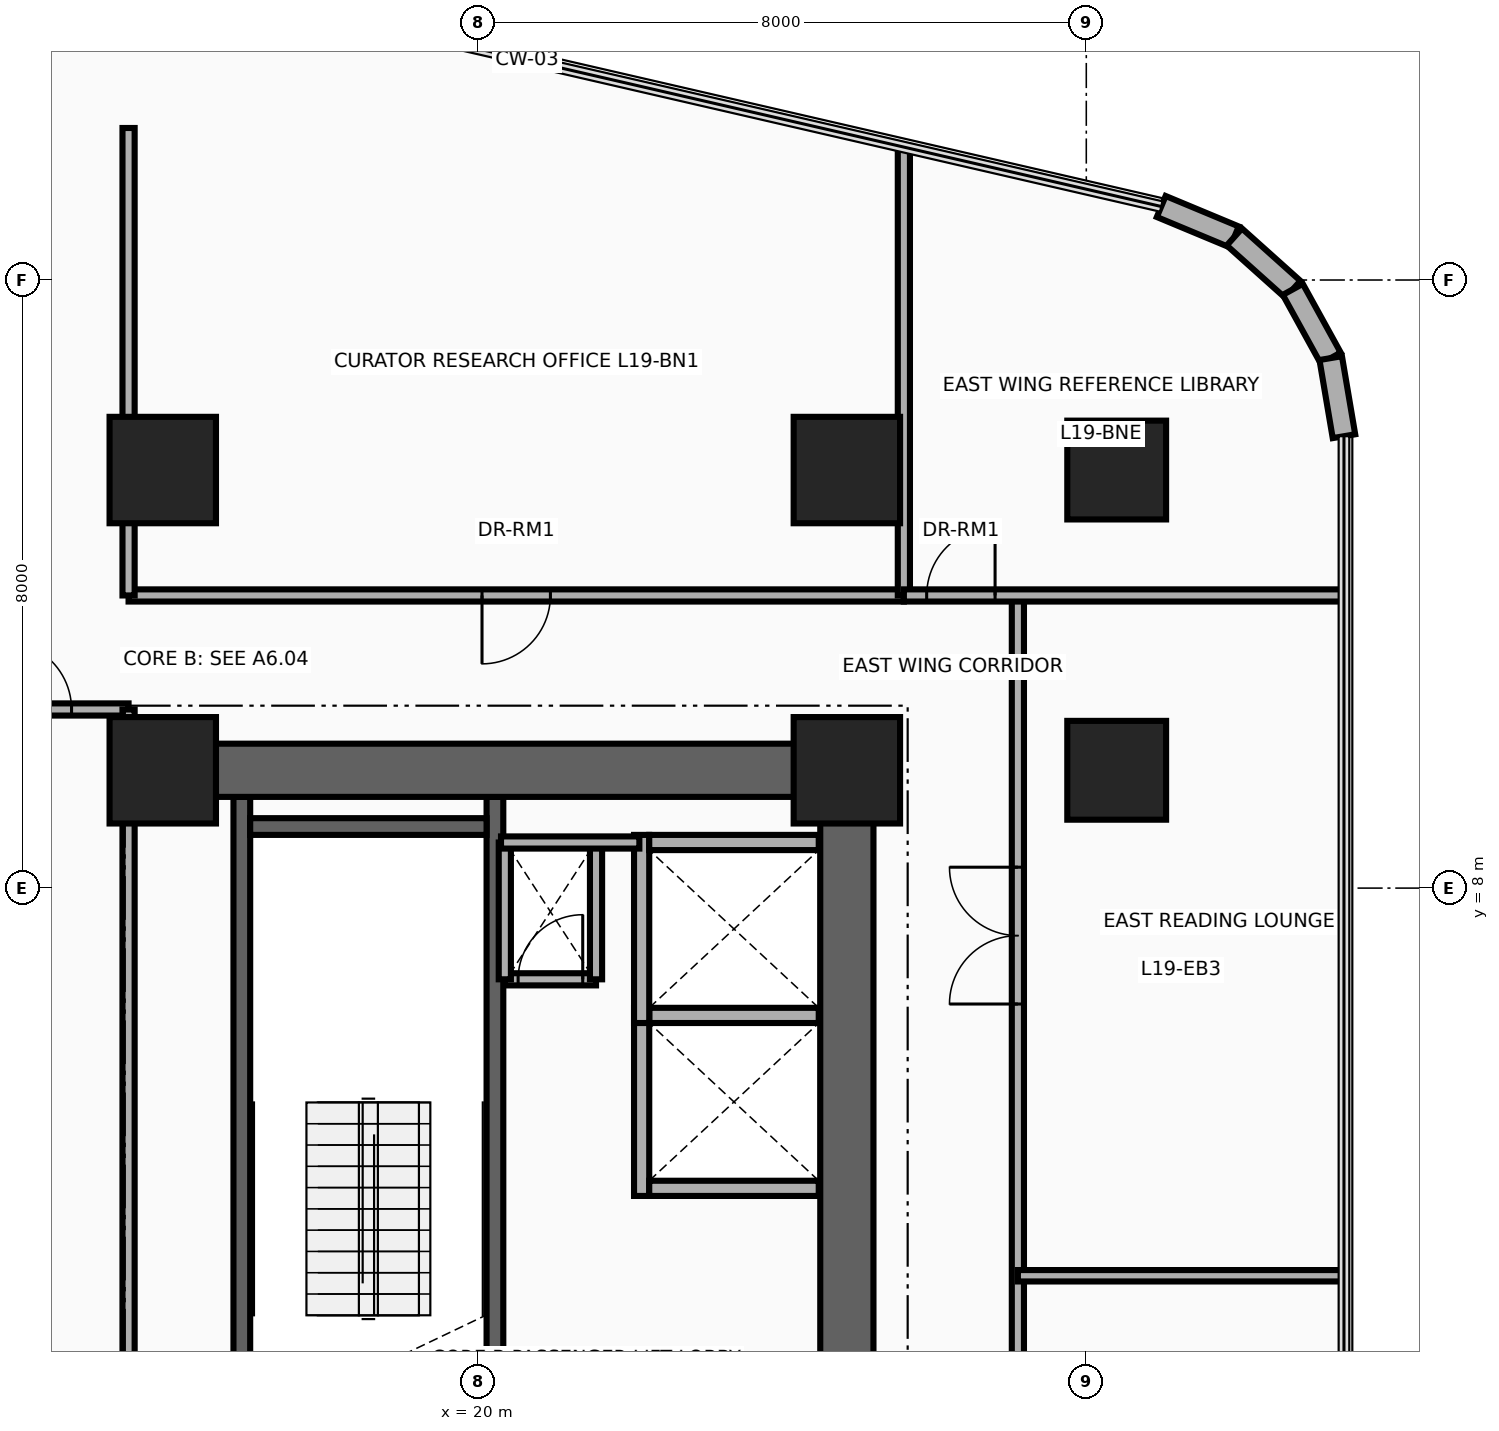
"""IFC4 building model, lengths in metres.
Left out: names, types, materials, properties, quantities, classifications, styles, units other than length and angle.
Written with IfcOpenShell. Run it as: python <this file> out.ifc"""

import sys

from ifc_helpers import new_model, si_unit, direction, frame, frame_2d, origin, origin_2d, place, context, subcontext, project, spatial, rectangle, circle, extrude, source, transform, mapped, element, fill, save


model = new_model("IFC4")
c1 = context("Model", 3, precision=1e-05, world=origin(), true_north=direction((0.0, 1.0)))
c2 = subcontext(c1, "Body", "Model", "MODEL_VIEW")
j1 = project(units=[si_unit("LENGTHUNIT", "METRE"), si_unit("PLANEANGLEUNIT", "RADIAN")], contexts=[c1])
p1 = place(None, origin())
s1 = spatial("IfcSite", under=j1, at=p1, CompositionType="ELEMENT")
p2 = place(p1, origin())
s2 = spatial("IfcBuilding", under=s1, at=p2, CompositionType="ELEMENT")
p3 = place(p2, frame((0.0, 0.0, 77.8)))
s3 = spatial("IfcBuildingStorey", under=s2, at=p3, CompositionType="ELEMENT", Elevation=77.8)
for number, where, z_axis, x_axis in (
    (1, (16.89, 0.68, 0.0), (0.0, 0.0, 1.0), (0.0, 1.0, 0.0)),
    (2, (20.22, 0.68, 0.0), (0.0, 0.0, 1.0), (0.0, 1.0, 0.0)),
):
    element("IfcWall", number, at=place(p3, frame(where, z_axis=z_axis, x_axis=x_axis)), inside=s3, PredefinedType="SHEAR", context=c2, shape_type="SweptSolid", body=[
        extrude(rectangle(XDim=8.52, YDim=0.22, at=frame_2d((4.26, 0.0))), origin(), (0.0, 0.0, 1.0), 3.46),
    ])
p4 = place(p3, frame((17.0, 8.81, 0.0), z_axis=(0.0, 0.0, 1.0), x_axis=(1.0, 0.0, 0.0)))
e3 = element("IfcWall", 3, at=p4, inside=s3, PredefinedType="SHEAR", context=c2, shape_type="SweptSolid", body=[
    extrude(rectangle(XDim=3.11, YDim=0.22, at=frame_2d((1.555, 0.0))), origin(), (0.0, 0.0, 1.0), 3.46),
])
p5 = place(p3, frame((24.85, 0.95, 0.0), z_axis=(0.0, 0.0, 1.0), x_axis=(0.0, 1.0, 0.0)))
e4 = element("IfcWall", 4, at=p5, inside=s3, PredefinedType="SHEAR", context=c2, shape_type="SweptSolid", body=[
    extrude(rectangle(XDim=8.95, YDim=0.7, at=frame_2d((4.475, 0.0))), origin(), (0.0, 0.0, 1.0), 3.46),
])
p6 = place(p3, frame((15.85, 9.55, 0.0), z_axis=(0.0, 0.0, 1.0), x_axis=(1.0, 0.0, 0.0)))
e5 = element("IfcWall", 5, at=p6, inside=s3, PredefinedType="SHEAR", context=c2, shape_type="SweptSolid", body=[
    extrude(rectangle(XDim=9.0, YDim=0.7, at=frame_2d((4.5, 0.0))), origin(), (0.0, 0.0, 1.0), 3.46),
])
m1 = source(origin(), c2, "Body", "SweptSolid", [
    extrude(rectangle(XDim=1.4, YDim=1.4, at=origin_2d()), origin(), (0.0, 0.0, 1.0), 3.7),
])
for number, where, z_axis, x_axis in (
    (6, (15.85, 9.55, 0.0), (0.0, 0.0, 1.0), (1.0, 0.0, 0.0)),
    (7, (24.85, 9.55, 0.0), (0.0, 0.0, 1.0), (1.0, 0.0, 0.0)),
):
    element("IfcColumn", number, at=place(p3, frame(where, z_axis=z_axis, x_axis=x_axis)), inside=s3, PredefinedType="COLUMN", context=c2, shape_type="MappedRepresentation", body=[
        mapped(m1, transform((0.0, 0.0, 0.0), x_axis=(1.0, 0.0, 0.0), y_axis=(0.0, 1.0, 0.0), z_axis=(0.0, 0.0, 1.0), scale=1.0)),
    ])
m2 = source(origin(), c2, "Body", "SweptSolid", [
    extrude(circle(Radius=0.65, at=origin_2d()), origin(), (0.0, 0.0, 1.0), 3.7),
])
p7 = place(p3, frame((28.4, 9.55, 0.0), z_axis=(0.0, 0.0, 1.0), x_axis=(1.0, 0.0, 0.0)))
e8 = element("IfcColumn", 8, at=p7, inside=s3, PredefinedType="COLUMN", context=c2, shape_type="MappedRepresentation", body=[
    mapped(m2, transform((0.0, 0.0, 0.0), x_axis=(1.0, 0.0, 0.0), y_axis=(0.0, 1.0, 0.0), z_axis=(0.0, 0.0, 1.0), scale=1.0)),
])
for number, where, z_axis, x_axis in (
    (9, (15.85, 13.5, 0.0), (0.0, 0.0, 1.0), (1.0, 0.0, 0.0)),
    (10, (24.85, 13.5, 0.0), (0.0, 0.0, 1.0), (1.0, 0.0, 0.0)),
):
    element("IfcColumn", number, at=place(p3, frame(where, z_axis=z_axis, x_axis=x_axis)), inside=s3, PredefinedType="COLUMN", context=c2, shape_type="MappedRepresentation", body=[
        mapped(m1, transform((0.0, 0.0, 0.0), x_axis=(1.0, 0.0, 0.0), y_axis=(0.0, 1.0, 0.0), z_axis=(0.0, 0.0, 1.0), scale=1.0)),
    ])
p8 = place(p3, frame((28.4, 13.5, 0.0), z_axis=(0.0, 0.0, 1.0), x_axis=(1.0, 0.0, 0.0)))
e11 = element("IfcColumn", 11, at=p8, inside=s3, PredefinedType="COLUMN", context=c2, shape_type="MappedRepresentation", body=[
    mapped(m2, transform((0.0, 0.0, 0.0), x_axis=(1.0, 0.0, 0.0), y_axis=(0.0, 1.0, 0.0), z_axis=(0.0, 0.0, 1.0), scale=1.0)),
])
p9 = place(p3, frame((28.986, 16.967, 0.0), z_axis=(0.0, 0.0, 1.0), x_axis=(0.923083852684, -0.384598753136, 0.0)))
e12 = element("IfcWall", 12, at=p9, inside=s3, PredefinedType="SOLIDWALL", context=c2, shape_type="SweptSolid", body=[
    extrude(rectangle(XDim=1.042, YDim=0.3, at=frame_2d((0.521, 0.0))), origin(), (0.0, 0.0, 1.0), 3.46),
])
p10 = place(p3, frame((29.948, 16.566, 0.0), z_axis=(0.0, 0.0, 1.0), x_axis=(0.744585645533, -0.66752694063, 0.0)))
e13 = element("IfcWall", 13, at=p10, inside=s3, PredefinedType="SOLIDWALL", context=c2, shape_type="SweptSolid", body=[
    extrude(rectangle(XDim=1.033, YDim=0.3, at=frame_2d((0.517, 0.0))), origin(), (0.0, 0.0, 1.0), 3.46),
])
p11 = place(p3, frame((30.717, 15.877, 0.0), z_axis=(0.0, 0.0, 1.0), x_axis=(0.482971098131, -0.875636293429, 0.0)))
e14 = element("IfcWall", 14, at=p11, inside=s3, PredefinedType="SOLIDWALL", context=c2, shape_type="SweptSolid", body=[
    extrude(rectangle(XDim=1.033, YDim=0.3, at=frame_2d((0.516, 0.0))), origin(), (0.0, 0.0, 1.0), 3.46),
])
p12 = place(p3, frame((31.216, 14.973, 0.0), z_axis=(0.0, 0.0, 1.0), x_axis=(0.167019462117, -0.985953598946, 0.0)))
e15 = element("IfcWall", 15, at=p12, inside=s3, PredefinedType="SOLIDWALL", context=c2, shape_type="SweptSolid", body=[
    extrude(rectangle(XDim=1.042, YDim=0.3, at=frame_2d((0.521, 0.0))), origin(), (0.0, 0.0, 1.0), 3.46),
])
p13 = place(p3, frame((22.15, 3.95, 0.0), z_axis=(0.0, 0.0, 1.0), x_axis=(0.0, 1.0, 0.0)))
e16 = element("IfcWall", 16, at=p13, inside=s3, PredefinedType="MOVABLE", context=c2, shape_type="SweptSolid", body=[
    extrude(rectangle(XDim=2.475, YDim=0.2, at=frame_2d((1.238, 0.0))), origin(), (0.0, 0.0, 1.0), 3.46),
])
for number, where, z_axis, x_axis in (
    (17, (22.25, 4.05, 0.0), (0.0, 0.0, 1.0), (1.0, 0.0, 0.0)),
    (18, (22.25, 6.325, 0.0), (0.0, 0.0, 1.0), (1.0, 0.0, 0.0)),
):
    element("IfcWall", number, at=place(p3, frame(where, z_axis=z_axis, x_axis=x_axis)), inside=s3, PredefinedType="MOVABLE", context=c2, shape_type="SweptSolid", body=[
        extrude(rectangle(XDim=2.23, YDim=0.2, at=frame_2d((1.115, 0.0))), origin(), (0.0, 0.0, 1.0), 2.245),
    ])
p14 = place(p3, frame((22.15, 6.225, 0.0), z_axis=(0.0, 0.0, 1.0), x_axis=(0.0, 1.0, 0.0)))
e19 = element("IfcWall", 19, at=p14, inside=s3, PredefinedType="MOVABLE", context=c2, shape_type="SweptSolid", body=[
    extrude(rectangle(XDim=2.475, YDim=0.2, at=frame_2d((1.237, 0.0))), origin(), (0.0, 0.0, 1.0), 3.46),
])
p15 = place(p3, frame((22.25, 8.6, 0.0), z_axis=(0.0, 0.0, 1.0), x_axis=(1.0, 0.0, 0.0)))
e20 = element("IfcWall", 20, at=p15, inside=s3, PredefinedType="MOVABLE", context=c2, shape_type="SweptSolid", body=[
    extrude(rectangle(XDim=2.23, YDim=0.2, at=frame_2d((1.115, 0.0))), origin(), (0.0, 0.0, 1.0), 2.245),
])
p16 = place(p3, frame((20.35, 6.8, 0.0), z_axis=(0.0, 0.0, 1.0), x_axis=(1.0, 0.0, 0.0)))
e21 = element("IfcWall", 21, at=p16, inside=s3, PredefinedType="PARTITIONING", context=c2, shape_type="SweptSolid", body=[
    extrude(rectangle(XDim=1.2, YDim=0.16, at=frame_2d((0.6, 0.0))), origin(), (0.0, 0.0, 1.0), 3.46),
])
p17 = place(p16, frame((0.175, 0.0, 0.0)))
e22 = element("IfcOpeningElement", 22, at=p17, cuts=e21, PredefinedType="OPENING", context=c2, shape_type="SweptSolid", body=[
    extrude(rectangle(XDim=0.85, YDim=2.05, at=frame_2d((0.425, 1.025))), frame((0.0, 0.095, 0.0), z_axis=(0.0, -1.0, 0.0), x_axis=(1.0, 0.0, 0.0)), (0.0, 0.0, 1.0), 0.19),
])
for number, where, z_axis, x_axis in (
    (23, (21.55, 6.8, 0.0), (0.0, 0.0, 1.0), (0.0, 1.0, 0.0)),
    (24, (20.35, 6.8, 0.0), (0.0, 0.0, 1.0), (0.0, 1.0, 0.0)),
):
    element("IfcWall", number, at=place(p3, frame(where, z_axis=z_axis, x_axis=x_axis)), inside=s3, PredefinedType="PARTITIONING", context=c2, shape_type="SweptSolid", body=[
        extrude(rectangle(XDim=1.8, YDim=0.16, at=frame_2d((0.9, 0.0))), origin(), (0.0, 0.0, 1.0), 3.46),
    ])
p18 = place(p3, frame((20.3, 8.6, 0.0), z_axis=(0.0, 0.0, 1.0), x_axis=(1.0, 0.0, 0.0)))
e25 = element("IfcWall", 25, at=p18, inside=s3, PredefinedType="PARTITIONING", context=c2, shape_type="SweptSolid", body=[
    extrude(rectangle(XDim=1.82, YDim=0.16, at=frame_2d((0.91, 0.0))), origin(), (0.0, 0.0, 1.0), 3.46),
])
p19 = place(p3, frame((15.4, 11.85, 0.0), z_axis=(0.0, 0.0, 1.0), x_axis=(1.0, 0.0, 0.0)))
e26 = element("IfcWall", 26, at=p19, inside=s3, PredefinedType="PARTITIONING", context=c2, shape_type="SweptSolid", body=[
    extrude(rectangle(XDim=10.2, YDim=0.16, at=frame_2d((5.1, 0.0))), origin(), (0.0, 0.0, 1.0), 2.834),
])
p20 = place(p19, frame((4.65, 0.0, 0.0)))
e27 = element("IfcOpeningElement", 27, at=p20, cuts=e26, PredefinedType="OPENING", context=c2, shape_type="SweptSolid", body=[
    extrude(rectangle(XDim=0.9, YDim=2.1, at=frame_2d((0.45, 1.05))), frame((0.0, 0.095, 0.0), z_axis=(0.0, -1.0, 0.0), x_axis=(1.0, 0.0, 0.0)), (0.0, 0.0, 1.0), 0.19),
])
p21 = place(p3, frame((15.4, 11.85, 0.0), z_axis=(0.0, 0.0, 1.0), x_axis=(0.0, 1.0, 0.0)))
e28 = element("IfcWall", 28, at=p21, inside=s3, PredefinedType="PARTITIONING", context=c2, shape_type="SweptSolid", body=[
    extrude(rectangle(XDim=6.15, YDim=0.16, at=frame_2d((3.075, 0.0))), origin(), (0.0, 0.0, 1.0), 2.583),
])
p22 = place(p3, frame((25.6, 11.85, 0.0), z_axis=(0.0, 0.0, 1.0), x_axis=(0.0, 1.0, 0.0)))
e29 = element("IfcWall", 29, at=p22, inside=s3, PredefinedType="PARTITIONING", context=c2, shape_type="SweptSolid", body=[
    extrude(rectangle(XDim=5.898, YDim=0.16, at=frame_2d((2.949, 0.0))), origin(), (0.0, 0.0, 1.0), 2.583),
])
p23 = place(p3, frame((27.1, -13.89, 0.0), z_axis=(0.0, 0.0, 1.0), x_axis=(0.0, 1.0, 0.0)))
e30 = element("IfcWall", 30, at=p23, inside=s3, PredefinedType="PARTITIONING", context=c2, shape_type="SweptSolid", body=[
    extrude(rectangle(XDim=25.74, YDim=0.16, at=frame_2d((12.87, 0.0))), origin(), (0.0, 0.0, 1.0), 2.583),
])
p24 = place(p23, frame((1.76, 0.0, 0.0)))
e31 = element("IfcOpeningElement", 31, at=p24, cuts=e30, PredefinedType="OPENING", context=c2, shape_type="SweptSolid", body=[
    extrude(rectangle(XDim=1.8, YDim=2.15, at=frame_2d((0.9, 1.075))), frame((0.0, 0.095, 0.0), z_axis=(0.0, -1.0, 0.0), x_axis=(1.0, 0.0, 0.0)), (0.0, 0.0, 1.0), 0.19),
])
p25 = place(p23, frame((12.16, 0.0, 0.0)))
e32 = element("IfcOpeningElement", 32, at=p25, cuts=e30, PredefinedType="OPENING", context=c2, shape_type="SweptSolid", body=[
    extrude(rectangle(XDim=1.8, YDim=2.15, at=frame_2d((0.9, 1.075))), frame((0.0, 0.095, 0.0), z_axis=(0.0, -1.0, 0.0), x_axis=(1.0, 0.0, 0.0)), (0.0, 0.0, 1.0), 0.19),
])
p26 = place(p23, frame((20.365, 0.0, 0.0)))
e33 = element("IfcOpeningElement", 33, at=p26, cuts=e30, PredefinedType="OPENING", context=c2, shape_type="SweptSolid", body=[
    extrude(rectangle(XDim=1.8, YDim=2.15, at=frame_2d((0.9, 1.075))), frame((0.0, 0.095, 0.0), z_axis=(0.0, -1.0, 0.0), x_axis=(1.0, 0.0, 0.0)), (0.0, 0.0, 1.0), 0.19),
])
p27 = place(p3, frame((25.6, 11.85, 0.0), z_axis=(0.0, 0.0, 1.0), x_axis=(1.0, 0.0, 0.0)))
e34 = element("IfcWall", 34, at=p27, inside=s3, PredefinedType="PARTITIONING", context=c2, shape_type="SweptSolid", body=[
    extrude(rectangle(XDim=5.79, YDim=0.16, at=frame_2d((2.895, 0.0))), origin(), (0.0, 0.0, 1.0), 2.896),
])
p28 = place(p27, frame((0.3, 0.0, 0.0)))
e35 = element("IfcOpeningElement", 35, at=p28, cuts=e34, PredefinedType="OPENING", context=c2, shape_type="SweptSolid", body=[
    extrude(rectangle(XDim=0.9, YDim=2.1, at=frame_2d((0.45, 1.05))), frame((0.0, 0.095, 0.0), z_axis=(0.0, -1.0, 0.0), x_axis=(1.0, 0.0, 0.0)), (0.0, 0.0, 1.0), 0.19),
])
p29 = place(p3, frame((27.1, 2.9, 0.0), z_axis=(0.0, 0.0, 1.0), x_axis=(1.0, 0.0, 0.0)))
e36 = element("IfcWall", 36, at=p29, inside=s3, PredefinedType="PARTITIONING", context=c2, shape_type="SweptSolid", body=[
    extrude(rectangle(XDim=4.29, YDim=0.15, at=frame_2d((2.145, 0.0))), origin(), (0.0, 0.0, 1.0), 2.896),
])
p30 = place(p3, frame((13.3, 10.35, 0.0), z_axis=(0.0, 0.0, 1.0), x_axis=(1.0, 0.0, 0.0)))
e37 = element("IfcWall", 37, at=p30, inside=s3, PredefinedType="PARTITIONING", context=c2, shape_type="SweptSolid", body=[
    extrude(rectangle(XDim=2.1, YDim=0.16, at=frame_2d((1.05, 0.0))), origin(), (0.0, 0.0, 1.0), 2.583),
])
p31 = place(p30, frame((0.45, 0.0, 0.0)))
e38 = element("IfcOpeningElement", 38, at=p31, cuts=e37, PredefinedType="OPENING", context=c2, shape_type="SweptSolid", body=[
    extrude(rectangle(XDim=0.9, YDim=2.1, at=frame_2d((0.45, 1.05))), frame((0.0, 0.095, 0.0), z_axis=(0.0, -1.0, 0.0), x_axis=(1.0, 0.0, 0.0)), (0.0, 0.0, 1.0), 0.19),
])
p32 = place(p3, frame((15.4, 1.0, 0.0), z_axis=(0.0, 0.0, 1.0), x_axis=(0.0, 1.0, 0.0)))
e39 = element("IfcWall", 39, at=p32, inside=s3, PredefinedType="PARTITIONING", context=c2, shape_type="SweptSolid", body=[
    extrude(rectangle(XDim=9.35, YDim=0.16, at=frame_2d((4.675, 0.0))), origin(), (0.0, 0.0, 1.0), 2.245),
])
p33 = place(p17, origin())
e40 = element("IfcDoor", 40, at=p33, inside=s3, OperationType="SINGLE_SWING_RIGHT", PredefinedType="DOOR", context=c2, shape_type="SweptSolid", body=[
    extrude(rectangle(XDim=0.85, YDim=2.05, at=frame_2d((0.425, 1.025))), frame((0.0, 0.025, 0.0), z_axis=(0.0, -1.0, 0.0), x_axis=(1.0, 0.0, 0.0)), (0.0, 0.0, 1.0), 0.05),
])
fill(e22, e40)
p34 = place(p20, frame((0.9, 0.0, 0.0), z_axis=(0.0, 0.0, 1.0), x_axis=(-1.0, 0.0, 0.0)))
e41 = element("IfcDoor", 41, at=p34, inside=s3, OperationType="SINGLE_SWING_LEFT", PredefinedType="DOOR", context=c2, shape_type="SweptSolid", body=[
    extrude(rectangle(XDim=0.9, YDim=2.1, at=frame_2d((0.45, 1.05))), frame((0.0, 0.025, 0.0), z_axis=(0.0, -1.0, 0.0), x_axis=(1.0, 0.0, 0.0)), (0.0, 0.0, 1.0), 0.05),
])
fill(e27, e41)
p35 = place(p28, origin())
e42 = element("IfcDoor", 42, at=p35, inside=s3, OperationType="SINGLE_SWING_LEFT", PredefinedType="DOOR", context=c2, shape_type="SweptSolid", body=[
    extrude(rectangle(XDim=0.9, YDim=2.1, at=frame_2d((0.45, 1.05))), frame((0.0, 0.025, 0.0), z_axis=(0.0, -1.0, 0.0), x_axis=(1.0, 0.0, 0.0)), (0.0, 0.0, 1.0), 0.05),
])
fill(e35, e42)
p36 = place(p26, origin())
e43 = element("IfcDoor", 43, at=p36, inside=s3, OperationType="DOUBLE_DOOR_SINGLE_SWING", PredefinedType="DOOR", context=c2, shape_type="SweptSolid", body=[
    extrude(rectangle(XDim=1.8, YDim=2.15, at=frame_2d((0.9, 1.075))), frame((0.0, 0.025, 0.0), z_axis=(0.0, -1.0, 0.0), x_axis=(1.0, 0.0, 0.0)), (0.0, 0.0, 1.0), 0.05),
])
fill(e33, e43)
p37 = place(p31, origin())
e44 = element("IfcDoor", 44, at=p37, inside=s3, OperationType="SINGLE_SWING_LEFT", PredefinedType="DOOR", context=c2, shape_type="SweptSolid", body=[
    extrude(rectangle(XDim=0.9, YDim=2.1, at=frame_2d((0.45, 1.05))), frame((0.0, 0.025, 0.0), z_axis=(0.0, -1.0, 0.0), x_axis=(1.0, 0.0, 0.0)), (0.0, 0.0, 1.0), 0.05),
])
fill(e38, e44)
save(model, sys.argv[1])
